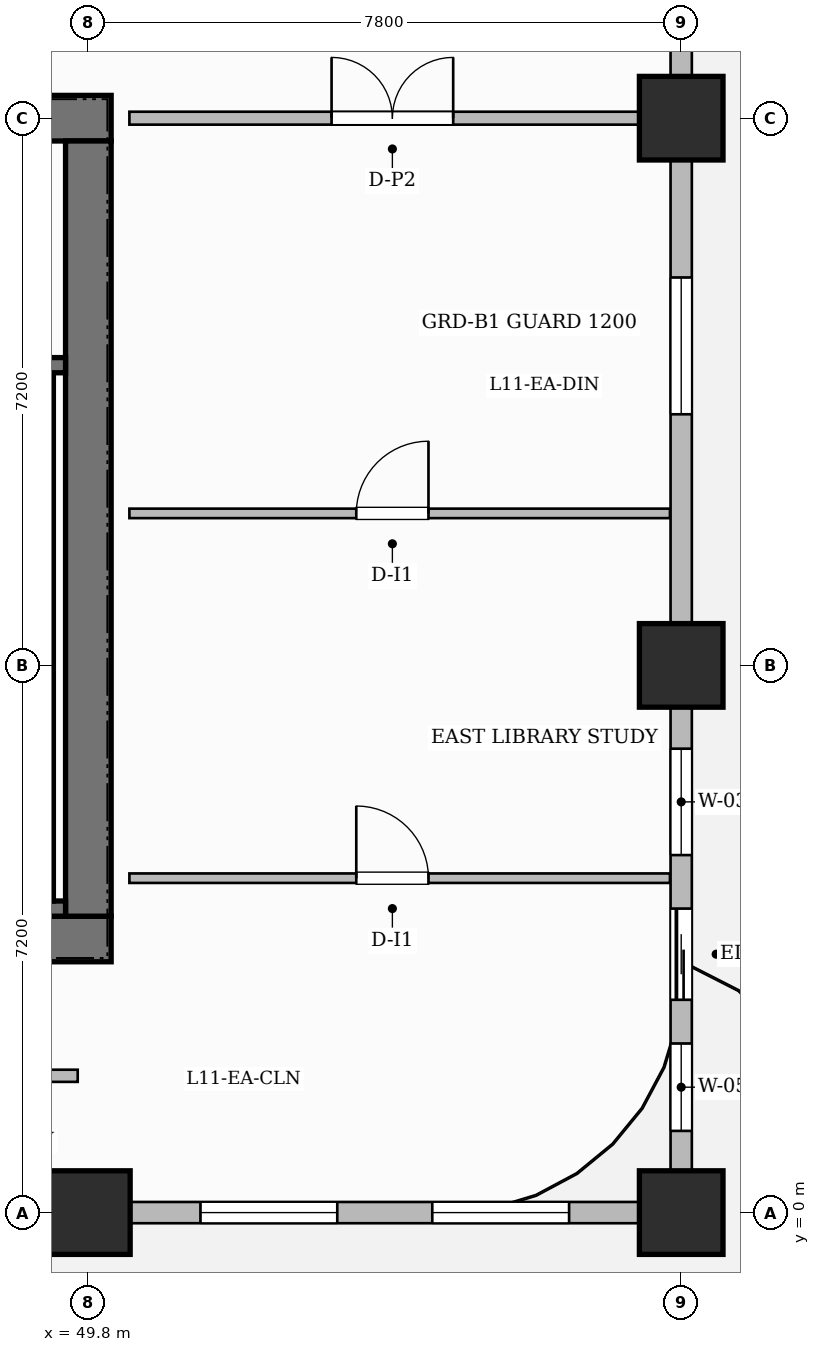
"""IFC4 building model, lengths in metres.
Left out: names, types, materials, properties, quantities, classifications, styles, units other than length and angle.
Written with IfcOpenShell. Run it as: python <this file> out.ifc"""

import sys

from ifc_helpers import new_model, si_unit, direction, frame, frame_2d, origin, origin_2d, place, context, subcontext, project, spatial, rectangle, extrude, source, transform, mapped, element, fill, save


model = new_model("IFC4")
c1 = context("Model", 3, precision=1e-05, world=origin(), true_north=direction((0.0, 1.0)))
c2 = subcontext(c1, "Body", "Model", "MODEL_VIEW")
j1 = project(units=[si_unit("LENGTHUNIT", "METRE"), si_unit("PLANEANGLEUNIT", "RADIAN")], contexts=[c1])
p1 = place(None, origin())
s1 = spatial("IfcSite", under=j1, at=p1, CompositionType="ELEMENT")
p2 = place(p1, origin())
s2 = spatial("IfcBuilding", under=s1, at=p2, CompositionType="ELEMENT")
p3 = place(p2, frame((0.0, 0.0, 50.9)))
s3 = spatial("IfcBuildingStorey", under=s2, at=p3, CompositionType="ELEMENT", Elevation=50.9)
p4 = place(p3, frame((34.5, 3.6, 0.0), z_axis=(0.0, 0.0, 1.0), x_axis=(1.0, 0.0, 0.0)))
e1 = element("IfcWall", 1, at=p4, inside=s3, PredefinedType="SHEAR", context=c2, shape_type="SweptSolid", body=[
    extrude(rectangle(XDim=15.6, YDim=0.6, at=frame_2d((7.8, 0.0))), origin(), (0.0, 0.0, 1.0), 3.7),
])
p5 = place(p4, frame((4.13, 0.0, 0.0)))
e2 = element("IfcOpeningElement", 2, at=p5, cuts=e1, PredefinedType="OPENING", context=c2, shape_type="SweptSolid", body=[
    extrude(rectangle(XDim=0.9, YDim=2.1, at=frame_2d((0.45, 1.05))), frame((0.0, 0.31, 0.0), z_axis=(0.0, -1.0, 0.0), x_axis=(1.0, 0.0, 0.0)), (0.0, 0.0, 1.0), 0.62),
])
p6 = place(p4, frame((5.7, 0.0, 0.0)))
e3 = element("IfcOpeningElement", 3, at=p6, cuts=e1, PredefinedType="OPENING", context=c2, shape_type="SweptSolid", body=[
    extrude(rectangle(XDim=0.9, YDim=2.1, at=frame_2d((0.45, 1.05))), frame((0.0, 0.31, 0.0), z_axis=(0.0, -1.0, 0.0), x_axis=(1.0, 0.0, 0.0)), (0.0, 0.0, 1.0), 0.62),
])
p7 = place(p4, frame((7.3, 0.0, 0.0)))
e4 = element("IfcOpeningElement", 4, at=p7, cuts=e1, PredefinedType="OPENING", context=c2, shape_type="SweptSolid", body=[
    extrude(rectangle(XDim=0.9, YDim=2.1, at=frame_2d((0.45, 1.05))), frame((0.0, 0.31, 0.0), z_axis=(0.0, -1.0, 0.0), x_axis=(1.0, 0.0, 0.0)), (0.0, 0.0, 1.0), 0.62),
])
p8 = place(p3, frame((34.5, 14.4, 0.0), z_axis=(0.0, 0.0, 1.0), x_axis=(1.0, 0.0, 0.0)))
e5 = element("IfcWall", 5, at=p8, inside=s3, PredefinedType="SHEAR", context=c2, shape_type="SweptSolid", body=[
    extrude(rectangle(XDim=15.6, YDim=0.6, at=frame_2d((7.8, 0.0))), origin(), (0.0, 0.0, 1.0), 3.7),
])
p9 = place(p8, frame((5.43, 0.0, 0.0)))
e6 = element("IfcOpeningElement", 6, at=p9, cuts=e5, PredefinedType="OPENING", context=c2, shape_type="SweptSolid", body=[
    extrude(rectangle(XDim=1.5, YDim=2.2, at=frame_2d((0.75, 1.1))), frame((0.0, 0.31, 0.0), z_axis=(0.0, -1.0, 0.0), x_axis=(1.0, 0.0, 0.0)), (0.0, 0.0, 1.0), 0.62),
])
p10 = place(p8, frame((1.645, 0.0, 0.0)))
e7 = element("IfcOpeningElement", 7, at=p10, cuts=e5, PredefinedType="OPENING", context=c2, shape_type="SweptSolid", body=[
    extrude(rectangle(XDim=1.05, YDim=2.15, at=frame_2d((0.525, 1.075))), frame((0.0, 0.31, 0.0), z_axis=(0.0, -1.0, 0.0), x_axis=(1.0, 0.0, 0.0)), (0.0, 0.0, 1.0), 0.62),
])
p11 = place(p8, frame((11.275, 0.0, 0.0)))
e8 = element("IfcOpeningElement", 8, at=p11, cuts=e5, PredefinedType="OPENING", context=c2, shape_type="SweptSolid", body=[
    extrude(rectangle(XDim=1.05, YDim=2.15, at=frame_2d((0.525, 1.075))), frame((0.0, 0.31, 0.0), z_axis=(0.0, -1.0, 0.0), x_axis=(1.0, 0.0, 0.0)), (0.0, 0.0, 1.0), 0.62),
])
p12 = place(p3, frame((49.8, 3.9, 0.0), z_axis=(0.0, 0.0, 1.0), x_axis=(0.0, 1.0, 0.0)))
e9 = element("IfcWall", 9, at=p12, inside=s3, PredefinedType="SHEAR", context=c2, shape_type="SweptSolid", body=[
    extrude(rectangle(XDim=10.2, YDim=0.6, at=frame_2d((5.1, 0.0))), origin(), (0.0, 0.0, 1.0), 3.7),
])
m1 = source(origin(), c2, "Body", "SweptSolid", [
    extrude(rectangle(XDim=1.1, YDim=1.1, at=origin_2d()), origin(), (0.0, 0.0, 1.0), 3.7),
])
for number, where, z_axis, x_axis in (
    (10, (49.8, 0.0, 0.0), (0.0, 0.0, 1.0), (1.0, 0.0, 0.0)),
    (11, (57.6, 0.0, 0.0), (0.0, 0.0, 1.0), (1.0, 0.0, 0.0)),
    (12, (57.6, 7.2, 0.0), (0.0, 0.0, 1.0), (1.0, 0.0, 0.0)),
    (13, (57.6, 14.4, 0.0), (0.0, 0.0, 1.0), (1.0, 0.0, 0.0)),
):
    element("IfcColumn", number, at=place(p3, frame(where, z_axis=z_axis, x_axis=x_axis)), inside=s3, PredefinedType="COLUMN", context=c2, shape_type="MappedRepresentation", body=[
        mapped(m1, transform((0.0, 0.0, 0.0), scale=1.0)),
    ])
p13 = place(p3, frame((43.12, 4.0, 0.0), z_axis=(0.0, 0.0, 1.0), x_axis=(1.0, 0.0, 0.0)))
e14 = element("IfcWall", 14, at=p13, inside=s3, PredefinedType="SHEAR", context=c2, shape_type="SweptSolid", body=[
    extrude(rectangle(XDim=6.38, YDim=0.2, at=frame_2d((3.19, 0.0))), origin(), (0.0, 0.0, 1.0), 3.7),
])
p14 = place(p3, frame((49.24, 4.1, 0.0), z_axis=(0.0, 0.0, 1.0), x_axis=(0.0, 1.0, 0.0)))
e15 = element("IfcWall", 15, at=p14, inside=s3, PredefinedType="SHEAR", context=c2, shape_type="SweptSolid", body=[
    extrude(rectangle(XDim=6.95, YDim=0.2, at=frame_2d((3.475, 0.0))), origin(), (0.0, 0.0, 1.0), 3.7),
])
p15 = place(p3, frame((43.12, 11.15, 0.0), z_axis=(0.0, 0.0, 1.0), x_axis=(1.0, 0.0, 0.0)))
e16 = element("IfcWall", 16, at=p15, inside=s3, PredefinedType="SHEAR", context=c2, shape_type="SweptSolid", body=[
    extrude(rectangle(XDim=6.38, YDim=0.2, at=frame_2d((3.19, 0.0))), origin(), (0.0, 0.0, 1.0), 3.7),
])
p16 = place(p15, frame((1.045, 0.0, 0.0)))
e17 = element("IfcOpeningElement", 17, at=p16, cuts=e16, PredefinedType="OPENING", context=c2, shape_type="SweptSolid", body=[
    extrude(rectangle(XDim=1.05, YDim=2.2, at=frame_2d((0.525, 1.1))), frame((0.0, 0.11, 0.0), z_axis=(0.0, -1.0, 0.0), x_axis=(1.0, 0.0, 0.0)), (0.0, 0.0, 1.0), 0.22),
])
p17 = place(p15, frame((4.125, 0.0, 0.0)))
e18 = element("IfcOpeningElement", 18, at=p17, cuts=e16, PredefinedType="OPENING", context=c2, shape_type="SweptSolid", body=[
    extrude(rectangle(XDim=1.05, YDim=2.2, at=frame_2d((0.525, 1.1))), frame((0.0, 0.11, 0.0), z_axis=(0.0, -1.0, 0.0), x_axis=(1.0, 0.0, 0.0)), (0.0, 0.0, 1.0), 0.22),
])
p18 = place(p3, frame((30.29, 1.8, 0.0), z_axis=(0.0, 0.0, 1.0), x_axis=(1.0, 0.0, 0.0)))
e19 = element("IfcWall", 19, at=p18, inside=s3, PredefinedType="PARTITIONING", context=c2, shape_type="SweptSolid", body=[
    extrude(rectangle(XDim=19.37, YDim=0.16, at=frame_2d((9.685, 0.0))), origin(), (0.0, 0.0, 1.0), 3.45),
])
p19 = place(p18, frame((2.916, 0.0, 0.0)))
e20 = element("IfcOpeningElement", 20, at=p19, cuts=e19, PredefinedType="OPENING", context=c2, shape_type="SweptSolid", body=[
    extrude(rectangle(XDim=0.9, YDim=2.15, at=frame_2d((0.45, 1.075))), frame((0.0, 0.09, 0.0), z_axis=(0.0, -1.0, 0.0), x_axis=(1.0, 0.0, 0.0)), (0.0, 0.0, 1.0), 0.18),
])
p20 = place(p18, frame((9.66, 0.0, 0.0)))
e21 = element("IfcOpeningElement", 21, at=p20, cuts=e19, PredefinedType="OPENING", context=c2, shape_type="SweptSolid", body=[
    extrude(rectangle(XDim=0.9, YDim=2.15, at=frame_2d((0.45, 1.075))), frame((0.0, 0.09, 0.0), z_axis=(0.0, -1.0, 0.0), x_axis=(1.0, 0.0, 0.0)), (0.0, 0.0, 1.0), 0.18),
])
p21 = place(p18, frame((15.86, 0.0, 0.0)))
e22 = element("IfcOpeningElement", 22, at=p21, cuts=e19, PredefinedType="OPENING", context=c2, shape_type="SweptSolid", body=[
    extrude(rectangle(XDim=0.9, YDim=2.15, at=frame_2d((0.45, 1.075))), frame((0.0, 0.09, 0.0), z_axis=(0.0, -1.0, 0.0), x_axis=(1.0, 0.0, 0.0)), (0.0, 0.0, 1.0), 0.18),
])
p22 = place(p3, frame((50.34, 14.4, 0.0), z_axis=(0.0, 0.0, 1.0), x_axis=(1.0, 0.0, 0.0)))
e23 = element("IfcWall", 23, at=p22, inside=s3, PredefinedType="PARTITIONING", context=c2, shape_type="SweptSolid", body=[
    extrude(rectangle(XDim=7.07, YDim=0.17, at=frame_2d((3.535, 0.0))), origin(), (0.0, 0.0, 1.0), 2.885),
])
p23 = place(p22, frame((2.66, 0.0, 0.0)))
e24 = element("IfcOpeningElement", 24, at=p23, cuts=e23, PredefinedType="OPENING", context=c2, shape_type="SweptSolid", body=[
    extrude(rectangle(XDim=1.6, YDim=2.4, at=frame_2d((0.8, 1.2))), frame((0.0, 0.095, 0.0), z_axis=(0.0, -1.0, 0.0), x_axis=(1.0, 0.0, 0.0)), (0.0, 0.0, 1.0), 0.19),
])
p24 = place(p3, frame((50.34, 9.2, 0.0), z_axis=(0.0, 0.0, 1.0), x_axis=(1.0, 0.0, 0.0)))
e25 = element("IfcWall", 25, at=p24, inside=s3, PredefinedType="PARTITIONING", context=c2, shape_type="SweptSolid", body=[
    extrude(rectangle(XDim=7.112, YDim=0.125, at=frame_2d((3.556, 0.0))), origin(), (0.0, 0.0, 1.0), 3.45),
])
p25 = place(p24, frame((2.985, 0.0, 0.0)))
e26 = element("IfcOpeningElement", 26, at=p25, cuts=e25, PredefinedType="OPENING", context=c2, shape_type="SweptSolid", body=[
    extrude(rectangle(XDim=0.95, YDim=2.15, at=frame_2d((0.475, 1.075))), frame((0.0, 0.073, 0.0), z_axis=(0.0, -1.0, 0.0), x_axis=(1.0, 0.0, 0.0)), (0.0, 0.0, 1.0), 0.145),
])
p26 = place(p3, frame((50.34, 4.4, 0.0), z_axis=(0.0, 0.0, 1.0), x_axis=(1.0, 0.0, 0.0)))
e27 = element("IfcWall", 27, at=p26, inside=s3, PredefinedType="PARTITIONING", context=c2, shape_type="SweptSolid", body=[
    extrude(rectangle(XDim=7.112, YDim=0.125, at=frame_2d((3.556, 0.0))), origin(), (0.0, 0.0, 1.0), 3.45),
])
p27 = place(p26, frame((2.985, 0.0, 0.0)))
e28 = element("IfcOpeningElement", 28, at=p27, cuts=e27, PredefinedType="OPENING", context=c2, shape_type="SweptSolid", body=[
    extrude(rectangle(XDim=0.95, YDim=2.15, at=frame_2d((0.475, 1.075))), frame((0.0, 0.073, 0.0), z_axis=(0.0, -1.0, 0.0), x_axis=(1.0, 0.0, 0.0)), (0.0, 0.0, 1.0), 0.145),
])
p28 = place(p3, frame((14.4, 0.0, 0.0), z_axis=(0.0, 0.0, 1.0), x_axis=(1.0, 0.0, 0.0)))
e29 = element("IfcWall", 29, at=p28, inside=s3, PredefinedType="SOLIDWALL", context=c2, shape_type="SweptSolid", body=[
    extrude(rectangle(XDim=43.2, YDim=0.28, at=frame_2d((21.6, 0.0))), origin(), (0.0, 0.0, 1.0), 2.885),
])
p29 = place(p28, frame((1.5, 0.0, 0.0)))
e30 = element("IfcOpeningElement", 30, at=p29, cuts=e29, PredefinedType="OPENING", context=c2, shape_type="SweptSolid", body=[
    extrude(rectangle(XDim=1.2, YDim=2.2, at=frame_2d((0.6, 1.1))), frame((0.0, 0.15, 0.0), z_axis=(0.0, -1.0, 0.0), x_axis=(1.0, 0.0, 0.0)), (0.0, 0.0, 1.0), 0.3),
])
p30 = place(p28, frame((4.654, 0.0, 0.8)))
e31 = element("IfcOpeningElement", 31, at=p30, cuts=e29, PredefinedType="OPENING", context=c2, shape_type="SweptSolid", body=[
    extrude(rectangle(XDim=1.4, YDim=1.85, at=frame_2d((0.7, 0.925))), frame((0.0, 0.15, 0.0), z_axis=(0.0, -1.0, 0.0), x_axis=(1.0, 0.0, 0.0)), (0.0, 0.0, 1.0), 0.3),
])
p31 = place(p28, frame((8.181, 0.0, 0.8)))
e32 = element("IfcOpeningElement", 32, at=p31, cuts=e29, PredefinedType="OPENING", context=c2, shape_type="SweptSolid", body=[
    extrude(rectangle(XDim=0.95, YDim=1.75, at=frame_2d((0.475, 0.875))), frame((0.0, 0.15, 0.0), z_axis=(0.0, -1.0, 0.0), x_axis=(1.0, 0.0, 0.0)), (0.0, 0.0, 1.0), 0.3),
])
p32 = place(p28, frame((10.564, 0.0, 0.8)))
e33 = element("IfcOpeningElement", 33, at=p32, cuts=e29, PredefinedType="OPENING", context=c2, shape_type="SweptSolid", body=[
    extrude(rectangle(XDim=1.8, YDim=1.85, at=frame_2d((0.9, 0.925))), frame((0.0, 0.15, 0.0), z_axis=(0.0, -1.0, 0.0), x_axis=(1.0, 0.0, 0.0)), (0.0, 0.0, 1.0), 0.3),
])
p33 = place(p28, frame((16.804, 0.0, 0.8)))
e34 = element("IfcOpeningElement", 34, at=p33, cuts=e29, PredefinedType="OPENING", context=c2, shape_type="SweptSolid", body=[
    extrude(rectangle(XDim=1.8, YDim=1.85, at=frame_2d((0.9, 0.925))), frame((0.0, 0.15, 0.0), z_axis=(0.0, -1.0, 0.0), x_axis=(1.0, 0.0, 0.0)), (0.0, 0.0, 1.0), 0.3),
])
p34 = place(p28, frame((21.521, 0.0, 0.8)))
e35 = element("IfcOpeningElement", 35, at=p34, cuts=e29, PredefinedType="OPENING", context=c2, shape_type="SweptSolid", body=[
    extrude(rectangle(XDim=0.95, YDim=1.75, at=frame_2d((0.475, 0.875))), frame((0.0, 0.15, 0.0), z_axis=(0.0, -1.0, 0.0), x_axis=(1.0, 0.0, 0.0)), (0.0, 0.0, 1.0), 0.3),
])
p35 = place(p28, frame((23.904, 0.0, 0.8)))
e36 = element("IfcOpeningElement", 36, at=p35, cuts=e29, PredefinedType="OPENING", context=c2, shape_type="SweptSolid", body=[
    extrude(rectangle(XDim=1.8, YDim=1.85, at=frame_2d((0.9, 0.925))), frame((0.0, 0.15, 0.0), z_axis=(0.0, -1.0, 0.0), x_axis=(1.0, 0.0, 0.0)), (0.0, 0.0, 1.0), 0.3),
])
p36 = place(p28, frame((29.681, 0.0, 0.8)))
e37 = element("IfcOpeningElement", 37, at=p36, cuts=e29, PredefinedType="OPENING", context=c2, shape_type="SweptSolid", body=[
    extrude(rectangle(XDim=1.8, YDim=1.85, at=frame_2d((0.9, 0.925))), frame((0.0, 0.15, 0.0), z_axis=(0.0, -1.0, 0.0), x_axis=(1.0, 0.0, 0.0)), (0.0, 0.0, 1.0), 0.3),
])
p37 = place(p28, frame((32.327, 0.0, 0.8)))
e38 = element("IfcOpeningElement", 38, at=p37, cuts=e29, PredefinedType="OPENING", context=c2, shape_type="SweptSolid", body=[
    extrude(rectangle(XDim=1.8, YDim=1.85, at=frame_2d((0.9, 0.925))), frame((0.0, 0.15, 0.0), z_axis=(0.0, -1.0, 0.0), x_axis=(1.0, 0.0, 0.0)), (0.0, 0.0, 1.0), 0.3),
])
p38 = place(p28, frame((36.875, 0.0, 0.8)))
e39 = element("IfcOpeningElement", 39, at=p38, cuts=e29, PredefinedType="OPENING", context=c2, shape_type="SweptSolid", body=[
    extrude(rectangle(XDim=1.8, YDim=1.85, at=frame_2d((0.9, 0.925))), frame((0.0, 0.15, 0.0), z_axis=(0.0, -1.0, 0.0), x_axis=(1.0, 0.0, 0.0)), (0.0, 0.0, 1.0), 0.3),
])
p39 = place(p28, frame((39.925, 0.0, 0.8)))
e40 = element("IfcOpeningElement", 40, at=p39, cuts=e29, PredefinedType="OPENING", context=c2, shape_type="SweptSolid", body=[
    extrude(rectangle(XDim=1.8, YDim=1.85, at=frame_2d((0.9, 0.925))), frame((0.0, 0.15, 0.0), z_axis=(0.0, -1.0, 0.0), x_axis=(1.0, 0.0, 0.0)), (0.0, 0.0, 1.0), 0.3),
])
p40 = place(p3, frame((57.6, 0.05, 0.0), z_axis=(0.0, 0.0, 1.0), x_axis=(0.0, 1.0, 0.0)))
e41 = element("IfcWall", 41, at=p40, inside=s3, PredefinedType="SOLIDWALL", context=c2, shape_type="SweptSolid", body=[
    extrude(rectangle(XDim=21.5, YDim=0.28, at=frame_2d((10.75, 0.0))), origin(), (0.0, 0.0, 1.0), 2.885),
])
p41 = place(p40, frame((2.75, 0.0, 0.0)))
e42 = element("IfcOpeningElement", 42, at=p41, cuts=e41, PredefinedType="OPENING", context=c2, shape_type="SweptSolid", body=[
    extrude(rectangle(XDim=1.2, YDim=2.2, at=frame_2d((0.6, 1.1))), frame((0.0, 0.15, 0.0), z_axis=(0.0, -1.0, 0.0), x_axis=(1.0, 0.0, 0.0)), (0.0, 0.0, 1.0), 0.3),
])
p42 = place(p40, frame((1.025, 0.0, 0.8)))
e43 = element("IfcOpeningElement", 43, at=p42, cuts=e41, PredefinedType="OPENING", context=c2, shape_type="SweptSolid", body=[
    extrude(rectangle(XDim=1.15, YDim=1.8, at=frame_2d((0.575, 0.9))), frame((0.0, 0.15, 0.0), z_axis=(0.0, -1.0, 0.0), x_axis=(1.0, 0.0, 0.0)), (0.0, 0.0, 1.0), 0.3),
])
p43 = place(p40, frame((4.654, 0.0, 0.8)))
e44 = element("IfcOpeningElement", 44, at=p43, cuts=e41, PredefinedType="OPENING", context=c2, shape_type="SweptSolid", body=[
    extrude(rectangle(XDim=1.4, YDim=1.85, at=frame_2d((0.7, 0.925))), frame((0.0, 0.15, 0.0), z_axis=(0.0, -1.0, 0.0), x_axis=(1.0, 0.0, 0.0)), (0.0, 0.0, 1.0), 0.3),
])
p44 = place(p40, frame((10.454, 0.0, 0.8)))
e45 = element("IfcOpeningElement", 45, at=p44, cuts=e41, PredefinedType="OPENING", context=c2, shape_type="SweptSolid", body=[
    extrude(rectangle(XDim=1.8, YDim=1.85, at=frame_2d((0.9, 0.925))), frame((0.0, 0.15, 0.0), z_axis=(0.0, -1.0, 0.0), x_axis=(1.0, 0.0, 0.0)), (0.0, 0.0, 1.0), 0.3),
])
p45 = place(p40, frame((15.621, 0.0, 0.8)))
e46 = element("IfcOpeningElement", 46, at=p45, cuts=e41, PredefinedType="OPENING", context=c2, shape_type="SweptSolid", body=[
    extrude(rectangle(XDim=1.4, YDim=1.85, at=frame_2d((0.7, 0.925))), frame((0.0, 0.15, 0.0), z_axis=(0.0, -1.0, 0.0), x_axis=(1.0, 0.0, 0.0)), (0.0, 0.0, 1.0), 0.3),
])
p46 = place(p40, frame((18.229, 0.0, 0.8)))
e47 = element("IfcOpeningElement", 47, at=p46, cuts=e41, PredefinedType="OPENING", context=c2, shape_type="SweptSolid", body=[
    extrude(rectangle(XDim=1.8, YDim=1.85, at=frame_2d((0.9, 0.925))), frame((0.0, 0.15, 0.0), z_axis=(0.0, -1.0, 0.0), x_axis=(1.0, 0.0, 0.0)), (0.0, 0.0, 1.0), 0.3),
])
m2 = source(origin(), c2, "Body", "SweptSolid", [
    extrude(rectangle(XDim=1.6, YDim=2.4, at=frame_2d((0.8, 1.2))), frame((0.0, 0.025, 0.0), z_axis=(0.0, -1.0, 0.0), x_axis=(1.0, 0.0, 0.0)), (0.0, 0.0, 1.0), 0.05),
])
p47 = place(p23, origin())
e48 = element("IfcDoor", 48, at=p47, inside=s3, OperationType="DOUBLE_DOOR_SINGLE_SWING", PredefinedType="DOOR", context=c2, shape_type="MappedRepresentation", body=[
    mapped(m2, transform((0.0, 0.0, 0.0), scale=1.0)),
])
fill(e24, e48)
m3 = source(origin(), c2, "Body", "SweptSolid", [
    extrude(rectangle(XDim=0.95, YDim=2.15, at=frame_2d((0.475, 1.075))), frame((0.0, 0.025, 0.0), z_axis=(0.0, -1.0, 0.0), x_axis=(1.0, 0.0, 0.0)), (0.0, 0.0, 1.0), 0.05),
])
p48 = place(p25, origin())
e49 = element("IfcDoor", 49, at=p48, inside=s3, OperationType="SINGLE_SWING_RIGHT", PredefinedType="DOOR", context=c2, shape_type="MappedRepresentation", body=[
    mapped(m3, transform((0.0, 0.0, 0.0), scale=1.0)),
])
fill(e26, e49)
p49 = place(p27, origin())
e50 = element("IfcDoor", 50, at=p49, inside=s3, OperationType="SINGLE_SWING_LEFT", PredefinedType="DOOR", context=c2, shape_type="MappedRepresentation", body=[
    mapped(m3, transform((0.0, 0.0, 0.0), scale=1.0)),
])
fill(e28, e50)
m4 = source(origin(), c2, "Body", "SweptSolid", [
    extrude(rectangle(XDim=1.2, YDim=2.2, at=frame_2d((0.6, 1.1))), frame((0.0, 0.025, 0.0), z_axis=(0.0, -1.0, 0.0), x_axis=(1.0, 0.0, 0.0)), (0.0, 0.0, 1.0), 0.05),
])
p50 = place(p41, origin())
e51 = element("IfcDoor", 51, at=p50, inside=s3, OperationType="SLIDING_TO_LEFT", PredefinedType="DOOR", context=c2, shape_type="MappedRepresentation", body=[
    mapped(m4, transform((0.0, 0.0, 0.0), scale=1.0)),
])
fill(e42, e51)
m5 = source(origin(), c2, "Body", "SweptSolid", [
    extrude(rectangle(XDim=1.8, YDim=1.85, at=frame_2d((0.9, 0.925))), frame((0.0, 0.03, 0.0), z_axis=(0.0, -1.0, 0.0), x_axis=(1.0, 0.0, 0.0)), (0.0, 0.0, 1.0), 0.06),
])
p51 = place(p38, origin())
e52 = element("IfcWindow", 52, at=p51, inside=s3, PartitioningType="DOUBLE_PANEL_VERTICAL", PredefinedType="WINDOW", context=c2, shape_type="MappedRepresentation", body=[
    mapped(m5, transform((0.0, 0.0, 0.0), scale=1.0)),
])
fill(e39, e52)
p52 = place(p39, origin())
e53 = element("IfcWindow", 53, at=p52, inside=s3, PartitioningType="DOUBLE_PANEL_VERTICAL", PredefinedType="WINDOW", context=c2, shape_type="MappedRepresentation", body=[
    mapped(m5, transform((0.0, 0.0, 0.0), scale=1.0)),
])
fill(e40, e53)
m6 = source(origin(), c2, "Body", "SweptSolid", [
    extrude(rectangle(XDim=1.15, YDim=1.8, at=frame_2d((0.575, 0.9))), frame((0.0, 0.03, 0.0), z_axis=(0.0, -1.0, 0.0), x_axis=(1.0, 0.0, 0.0)), (0.0, 0.0, 1.0), 0.06),
])
p53 = place(p42, origin())
e54 = element("IfcWindow", 54, at=p53, inside=s3, PartitioningType="SINGLE_PANEL", PredefinedType="WINDOW", context=c2, shape_type="MappedRepresentation", body=[
    mapped(m6, transform((0.0, 0.0, 0.0), scale=1.0)),
])
fill(e43, e54)
m7 = source(origin(), c2, "Body", "SweptSolid", [
    extrude(rectangle(XDim=1.4, YDim=1.85, at=frame_2d((0.7, 0.925))), frame((0.0, 0.03, 0.0), z_axis=(0.0, -1.0, 0.0), x_axis=(1.0, 0.0, 0.0)), (0.0, 0.0, 1.0), 0.06),
])
p54 = place(p43, origin())
e55 = element("IfcWindow", 55, at=p54, inside=s3, PartitioningType="SINGLE_PANEL", PredefinedType="WINDOW", context=c2, shape_type="MappedRepresentation", body=[
    mapped(m7, transform((0.0, 0.0, 0.0), scale=1.0)),
])
fill(e44, e55)
p55 = place(p44, origin())
e56 = element("IfcWindow", 56, at=p55, inside=s3, PartitioningType="DOUBLE_PANEL_VERTICAL", PredefinedType="WINDOW", context=c2, shape_type="MappedRepresentation", body=[
    mapped(m5, transform((0.0, 0.0, 0.0), scale=1.0)),
])
fill(e45, e56)
save(model, sys.argv[1])
